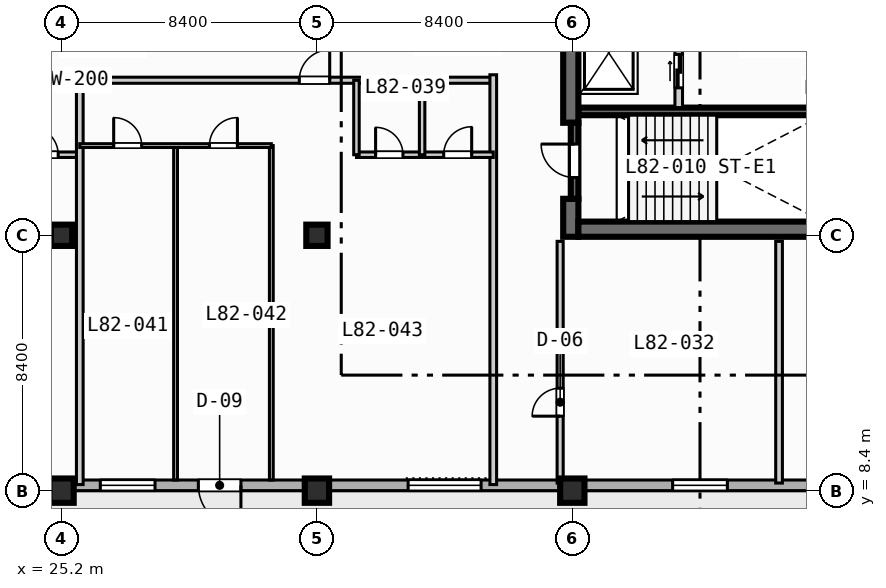
"""IFC4 building model, lengths in metres.
Left out: names, types, materials, properties, quantities, classifications, styles, units other than length and angle.
Written with IfcOpenShell. Run it as: python <this file> out.ifc"""

import sys

from ifc_helpers import new_model, si_unit, direction, frame, frame_2d, origin, origin_2d, place, context, subcontext, project, spatial, rectangle, extrude, element, fill, save


model = new_model("IFC4")
c1 = context("Model", 3, precision=1e-05, world=origin(), true_north=direction((0.0, 1.0)))
c2 = subcontext(c1, "Body", "Model", "MODEL_VIEW")
j1 = project(units=[si_unit("LENGTHUNIT", "METRE"), si_unit("PLANEANGLEUNIT", "RADIAN")], contexts=[c1])
p1 = place(None, origin())
s1 = spatial("IfcSite", under=j1, at=p1, CompositionType="ELEMENT")
p2 = place(p1, origin())
s2 = spatial("IfcBuilding", under=s1, at=p2, CompositionType="ELEMENT")
p3 = place(p2, frame((0.0, 0.0, 332.0)))
s3 = spatial("IfcBuildingStorey", under=s2, at=p3, CompositionType="ELEMENT", Elevation=332.0)
p4 = place(p3, frame((42.2, 20.875, 0.0), z_axis=(0.0, 0.0, 1.0), x_axis=(1.0, 0.0, 0.0)))
e1 = element("IfcWall", 1, at=p4, inside=s3, PredefinedType="SOLIDWALL", context=c2, shape_type="SweptSolid", body=[
    extrude(rectangle(XDim=8.05, YDim=0.25, at=frame_2d((4.025, 0.0))), origin(), (0.0, 0.0, 1.0), 3.67),
])
p5 = place(p3, frame((41.95, 16.75, 0.0), z_axis=(0.0, 0.0, 1.0), x_axis=(0.0, 1.0, 0.0)))
e2 = element("IfcWall", 2, at=p5, inside=s3, PredefinedType="SHEAR", context=c2, shape_type="SweptSolid", body=[
    extrude(rectangle(XDim=1.25, YDim=0.5, at=frame_2d((0.625, 0.0))), origin(), (0.0, 0.0, 1.0), 3.67),
])
p6 = place(p3, frame((41.95, 20.5, 0.0), z_axis=(0.0, 0.0, 1.0), x_axis=(0.0, 1.0, 0.0)))
e3 = element("IfcWall", 3, at=p6, inside=s3, PredefinedType="SHEAR", context=c2, shape_type="SweptSolid", body=[
    extrude(rectangle(XDim=4.95, YDim=0.5, at=frame_2d((2.475, 0.0))), origin(), (0.0, 0.0, 1.0), 3.67),
])
p7 = place(p3, frame((42.2, 17.0, 0.0), z_axis=(0.0, 0.0, 1.0), x_axis=(1.0, 0.0, 0.0)))
e4 = element("IfcWall", 4, at=p7, inside=s3, PredefinedType="SHEAR", context=c2, shape_type="SweptSolid", body=[
    extrude(rectangle(XDim=16.35, YDim=0.5, at=frame_2d((8.175, 0.0))), origin(), (0.0, 0.0, 1.0), 3.67),
])
p8 = place(p3, frame((25.2, 8.4, 0.0), z_axis=(0.0, 0.0, 1.0), x_axis=(1.0, 0.0, 0.0)))
e5 = element("IfcColumn", 5, at=p8, inside=s3, PredefinedType="COLUMN", context=c2, shape_type="SweptSolid", body=[
    extrude(rectangle(XDim=0.8, YDim=0.8, at=origin_2d()), origin(), (0.0, 0.0, 1.0), 3.9),
])
p9 = place(p3, frame((25.2, 16.8, 0.0), z_axis=(0.0, 0.0, 1.0), x_axis=(1.0, 0.0, 0.0)))
e6 = element("IfcColumn", 6, at=p9, inside=s3, PredefinedType="COLUMN", context=c2, shape_type="SweptSolid", body=[
    extrude(rectangle(XDim=0.7, YDim=0.7, at=origin_2d()), origin(), (0.0, 0.0, 1.0), 3.9),
])
p10 = place(p3, frame((33.6, 8.4, 0.0), z_axis=(0.0, 0.0, 1.0), x_axis=(1.0, 0.0, 0.0)))
e7 = element("IfcColumn", 7, at=p10, inside=s3, PredefinedType="COLUMN", context=c2, shape_type="SweptSolid", body=[
    extrude(rectangle(XDim=0.8, YDim=0.8, at=origin_2d()), origin(), (0.0, 0.0, 1.0), 3.9),
])
p11 = place(p3, frame((33.6, 16.8, 0.0), z_axis=(0.0, 0.0, 1.0), x_axis=(1.0, 0.0, 0.0)))
e8 = element("IfcColumn", 8, at=p11, inside=s3, PredefinedType="COLUMN", context=c2, shape_type="SweptSolid", body=[
    extrude(rectangle(XDim=0.7, YDim=0.7, at=origin_2d()), origin(), (0.0, 0.0, 1.0), 3.9),
])
p12 = place(p3, frame((42.0, 8.4, 0.0), z_axis=(0.0, 0.0, 1.0), x_axis=(1.0, 0.0, 0.0)))
e9 = element("IfcColumn", 9, at=p12, inside=s3, PredefinedType="COLUMN", context=c2, shape_type="SweptSolid", body=[
    extrude(rectangle(XDim=0.8, YDim=0.8, at=origin_2d()), origin(), (0.0, 0.0, 1.0), 3.9),
])
p13 = place(p3, frame((64.025, 8.575, 0.0), z_axis=(0.0, 0.0, 1.0), x_axis=(-1.0, 0.0, 0.0)))
e10 = element("IfcWall", 10, at=p13, inside=s3, PredefinedType="STANDARD", context=c2, shape_type="SweptSolid", body=[
    extrude(rectangle(XDim=52.45, YDim=0.35, at=frame_2d((26.225, 0.0))), origin(), (0.0, 0.0, 1.0), 3.67),
])
p14 = place(p13, frame((32.925, 0.0, 0.0)))
e11 = element("IfcOpeningElement", 11, at=p14, cuts=e10, PredefinedType="OPENING", context=c2, shape_type="SweptSolid", body=[
    extrude(rectangle(XDim=1.4, YDim=2.2, at=frame_2d((0.7, 1.1))), frame((0.0, 0.185, 0.0), z_axis=(0.0, -1.0, 0.0), x_axis=(1.0, 0.0, 0.0)), (0.0, 0.0, 1.0), 0.37),
])
p15 = place(p13, frame((41.825, 0.0, 0.85)))
e12 = element("IfcOpeningElement", 12, at=p15, cuts=e10, PredefinedType="OPENING", context=c2, shape_type="SweptSolid", body=[
    extrude(rectangle(XDim=2.4, YDim=1.95, at=frame_2d((1.2, 0.975))), frame((0.0, 0.185, 0.0), z_axis=(0.0, -1.0, 0.0), x_axis=(1.0, 0.0, 0.0)), (0.0, 0.0, 1.0), 0.37),
])
p16 = place(p13, frame((25.025, 0.0, 0.85)))
e13 = element("IfcOpeningElement", 13, at=p16, cuts=e10, PredefinedType="OPENING", context=c2, shape_type="SweptSolid", body=[
    extrude(rectangle(XDim=2.4, YDim=1.95, at=frame_2d((1.2, 0.975))), frame((0.0, 0.185, 0.0), z_axis=(0.0, -1.0, 0.0), x_axis=(1.0, 0.0, 0.0)), (0.0, 0.0, 1.0), 0.37),
])
p17 = place(p13, frame((16.925, 0.0, 0.85)))
e14 = element("IfcOpeningElement", 14, at=p17, cuts=e10, PredefinedType="OPENING", context=c2, shape_type="SweptSolid", body=[
    extrude(rectangle(XDim=1.8, YDim=1.8, at=frame_2d((0.9, 0.9))), frame((0.0, 0.185, 0.0), z_axis=(0.0, -1.0, 0.0), x_axis=(1.0, 0.0, 0.0)), (0.0, 0.0, 1.0), 0.37),
])
p18 = place(p13, frame((49.75, 0.0, 0.85)))
e15 = element("IfcOpeningElement", 15, at=p18, cuts=e10, PredefinedType="OPENING", context=c2, shape_type="SweptSolid", body=[
    extrude(rectangle(XDim=1.8, YDim=1.8, at=frame_2d((0.9, 0.9))), frame((0.0, 0.185, 0.0), z_axis=(0.0, -1.0, 0.0), x_axis=(1.0, 0.0, 0.0)), (0.0, 0.0, 1.0), 0.37),
])
p19 = place(p13, frame((47.89, 0.0, 0.85)))
e16 = element("IfcOpeningElement", 16, at=p19, cuts=e10, PredefinedType="OPENING", context=c2, shape_type="SweptSolid", body=[
    extrude(rectangle(XDim=0.72, YDim=1.8, at=frame_2d((0.36, 0.9))), frame((0.0, 0.185, 0.0), z_axis=(0.0, -1.0, 0.0), x_axis=(1.0, 0.0, 0.0)), (0.0, 0.0, 1.0), 0.37),
])
p20 = place(p13, frame((35.75, 0.0, 0.85)))
e17 = element("IfcOpeningElement", 17, at=p20, cuts=e10, PredefinedType="OPENING", context=c2, shape_type="SweptSolid", body=[
    extrude(rectangle(XDim=1.8, YDim=1.8, at=frame_2d((0.9, 0.9))), frame((0.0, 0.185, 0.0), z_axis=(0.0, -1.0, 0.0), x_axis=(1.0, 0.0, 0.0)), (0.0, 0.0, 1.0), 0.37),
])
p21 = place(p3, frame((42.075, 18.0, 0.0), z_axis=(0.0, 0.0, 1.0), x_axis=(0.0, 1.0, 0.0)))
e18 = element("IfcWall", 18, at=p21, inside=s3, PredefinedType="SOLIDWALL", context=c2, shape_type="SweptSolid", body=[
    extrude(rectangle(XDim=2.5, YDim=0.25, at=frame_2d((1.25, 0.0))), origin(), (0.0, 0.0, 1.0), 3.67),
])
p22 = place(p21, frame((0.7, 0.0, 0.0)))
e19 = element("IfcOpeningElement", 19, at=p22, cuts=e18, PredefinedType="OPENING", context=c2, shape_type="SweptSolid", body=[
    extrude(rectangle(XDim=1.1, YDim=2.15, at=frame_2d((0.55, 1.075))), frame((0.0, 0.135, 0.0), z_axis=(0.0, -1.0, 0.0), x_axis=(1.0, 0.0, 0.0)), (0.0, 0.0, 1.0), 0.27),
])
p23 = place(p3, frame((45.5, 21.0, 0.0), z_axis=(0.0, 0.0, 1.0), x_axis=(0.0, 1.0, 0.0)))
e20 = element("IfcWall", 20, at=p23, inside=s3, PredefinedType="SOLIDWALL", context=c2, shape_type="SweptSolid", body=[
    extrude(rectangle(XDim=4.15, YDim=0.25, at=frame_2d((2.075, 0.0))), origin(), (0.0, 0.0, 1.0), 3.67),
])
p24 = place(p23, frame((0.65, 0.0, 0.0)))
e21 = element("IfcOpeningElement", 21, at=p24, cuts=e20, PredefinedType="OPENING", context=c2, shape_type="SweptSolid", body=[
    extrude(rectangle(XDim=1.1, YDim=2.15, at=frame_2d((0.55, 1.075))), frame((0.0, 0.135, 0.0), z_axis=(0.0, -1.0, 0.0), x_axis=(1.0, 0.0, 0.0)), (0.0, 0.0, 1.0), 0.27),
])
p25 = place(p3, frame((41.6, 8.65, 0.0), z_axis=(0.0, 0.0, 1.0), x_axis=(0.0, 1.0, 0.0)))
e22 = element("IfcWall", 22, at=p25, inside=s3, PredefinedType="PARTITIONING", context=c2, shape_type="SweptSolid", body=[
    extrude(rectangle(XDim=7.95, YDim=0.2, at=frame_2d((3.975, 0.0))), origin(), (0.0, 0.0, 1.0), 3.67),
])
p26 = place(p25, frame((2.2, 0.0, 0.0)))
e23 = element("IfcOpeningElement", 23, at=p26, cuts=e22, PredefinedType="OPENING", context=c2, shape_type="SweptSolid", body=[
    extrude(rectangle(XDim=0.92, YDim=2.1, at=frame_2d((0.46, 1.05))), frame((0.0, 0.11, 0.0), z_axis=(0.0, -1.0, 0.0), x_axis=(1.0, 0.0, 0.0)), (0.0, 0.0, 1.0), 0.22),
])
p27 = place(p3, frame((48.8, 8.65, 0.0), z_axis=(0.0, 0.0, 1.0), x_axis=(0.0, 1.0, 0.0)))
e24 = element("IfcWall", 24, at=p27, inside=s3, PredefinedType="PARTITIONING", context=c2, shape_type="SweptSolid", body=[
    extrude(rectangle(XDim=7.95, YDim=0.22, at=frame_2d((3.975, 0.0))), origin(), (0.0, 0.0, 1.0), 3.67),
])
p28 = place(p3, frame((11.8, 21.9, 0.0), z_axis=(0.0, 0.0, 1.0), x_axis=(1.0, 0.0, 0.0)))
e25 = element("IfcWall", 25, at=p28, inside=s3, PredefinedType="PARTITIONING", context=c2, shape_type="SweptSolid", body=[
    extrude(rectangle(XDim=27.6, YDim=0.2, at=frame_2d((13.8, 0.0))), origin(), (0.0, 0.0, 1.0), 3.67),
])
p29 = place(p28, frame((7.42, 0.0, 0.0)))
e26 = element("IfcOpeningElement", 26, at=p29, cuts=e25, PredefinedType="OPENING", context=c2, shape_type="SweptSolid", body=[
    extrude(rectangle(XDim=1.0, YDim=2.15, at=frame_2d((0.5, 1.075))), frame((0.0, 0.11, 0.0), z_axis=(0.0, -1.0, 0.0), x_axis=(1.0, 0.0, 0.0)), (0.0, 0.0, 1.0), 0.22),
])
p30 = place(p28, frame((21.22, 0.0, 0.0)))
e27 = element("IfcOpeningElement", 27, at=p30, cuts=e25, PredefinedType="OPENING", context=c2, shape_type="SweptSolid", body=[
    extrude(rectangle(XDim=1.0, YDim=2.15, at=frame_2d((0.5, 1.075))), frame((0.0, 0.11, 0.0), z_axis=(0.0, -1.0, 0.0), x_axis=(1.0, 0.0, 0.0)), (0.0, 0.0, 1.0), 0.22),
])
p31 = place(p3, frame((21.3, 19.45, 0.0), z_axis=(0.0, 0.0, 1.0), x_axis=(1.0, 0.0, 0.0)))
e28 = element("IfcWall", 28, at=p31, inside=s3, PredefinedType="PLUMBINGWALL", context=c2, shape_type="SweptSolid", body=[
    extrude(rectangle(XDim=4.5, YDim=0.18, at=frame_2d((2.25, 0.0))), origin(), (0.0, 0.0, 1.0), 3.67),
])
p32 = place(p31, frame((0.63, 0.0, 0.0)))
e29 = element("IfcOpeningElement", 29, at=p32, cuts=e28, PredefinedType="OPENING", context=c2, shape_type="SweptSolid", body=[
    extrude(rectangle(XDim=0.9, YDim=2.1, at=frame_2d((0.45, 1.05))), frame((0.0, 0.1, 0.0), z_axis=(0.0, -1.0, 0.0), x_axis=(1.0, 0.0, 0.0)), (0.0, 0.0, 1.0), 0.2),
])
p33 = place(p31, frame((2.87, 0.0, 0.0)))
e30 = element("IfcOpeningElement", 30, at=p33, cuts=e28, PredefinedType="OPENING", context=c2, shape_type="SweptSolid", body=[
    extrude(rectangle(XDim=0.92, YDim=2.1, at=frame_2d((0.46, 1.05))), frame((0.0, 0.1, 0.0), z_axis=(0.0, -1.0, 0.0), x_axis=(1.0, 0.0, 0.0)), (0.0, 0.0, 1.0), 0.2),
])
for number, where, z_axis, x_axis in (
    (31, (25.8, 8.6, 0.0), (0.0, 0.0, 1.0), (0.0, 1.0, 0.0)),
    (32, (39.4, 8.6, 0.0), (0.0, 0.0, 1.0), (0.0, 1.0, 0.0)),
):
    element("IfcWall", number, at=place(p3, frame(where, z_axis=z_axis, x_axis=x_axis)), inside=s3, PredefinedType="PARTITIONING", context=c2, shape_type="SweptSolid", body=[
        extrude(rectangle(XDim=13.48, YDim=0.22, at=frame_2d((6.74, 0.0))), origin(), (0.0, 0.0, 1.0), 3.67),
    ])
p34 = place(p3, frame((34.9, 19.45, 0.0), z_axis=(0.0, 0.0, 1.0), x_axis=(1.0, 0.0, 0.0)))
e33 = element("IfcWall", 33, at=p34, inside=s3, PredefinedType="PLUMBINGWALL", context=c2, shape_type="SweptSolid", body=[
    extrude(rectangle(XDim=4.5, YDim=0.18, at=frame_2d((2.25, 0.0))), origin(), (0.0, 0.0, 1.0), 3.67),
])
p35 = place(p34, frame((0.63, 0.0, 0.0)))
e34 = element("IfcOpeningElement", 34, at=p35, cuts=e33, PredefinedType="OPENING", context=c2, shape_type="SweptSolid", body=[
    extrude(rectangle(XDim=0.9, YDim=2.1, at=frame_2d((0.45, 1.05))), frame((0.0, 0.1, 0.0), z_axis=(0.0, -1.0, 0.0), x_axis=(1.0, 0.0, 0.0)), (0.0, 0.0, 1.0), 0.2),
])
p36 = place(p34, frame((2.87, 0.0, 0.0)))
e35 = element("IfcOpeningElement", 35, at=p36, cuts=e33, PredefinedType="OPENING", context=c2, shape_type="SweptSolid", body=[
    extrude(rectangle(XDim=0.92, YDim=2.1, at=frame_2d((0.46, 1.05))), frame((0.0, 0.1, 0.0), z_axis=(0.0, -1.0, 0.0), x_axis=(1.0, 0.0, 0.0)), (0.0, 0.0, 1.0), 0.2),
])
for number, where, z_axis, x_axis in (
    (36, (34.9, 19.45, 0.0), (0.0, 0.0, 1.0), (0.0, 1.0, 0.0)),
    (37, (37.06, 19.45, 0.0), (0.0, 0.0, 1.0), (0.0, 1.0, 0.0)),
):
    element("IfcWall", number, at=place(p3, frame(where, z_axis=z_axis, x_axis=x_axis)), inside=s3, PredefinedType="PLUMBINGWALL", context=c2, shape_type="SweptSolid", body=[
        extrude(rectangle(XDim=2.45, YDim=0.18, at=frame_2d((1.225, 0.0))), origin(), (0.0, 0.0, 1.0), 3.67),
    ])
for number, where, z_axis, x_axis in (
    (38, (28.95, 8.75, 0.0), (0.0, 0.0, 1.0), (0.0, 1.0, 0.0)),
    (39, (32.1, 8.75, 0.0), (0.0, 0.0, 1.0), (0.0, 1.0, 0.0)),
):
    element("IfcWall", number, at=place(p3, frame(where, z_axis=z_axis, x_axis=x_axis)), inside=s3, PredefinedType="PARTITIONING", context=c2, shape_type="SweptSolid", body=[
        extrude(rectangle(XDim=11.0, YDim=0.125, at=frame_2d((5.5, 0.0))), origin(), (0.0, 0.0, 1.0), 3.67),
    ])
p37 = place(p3, frame((25.8, 19.75, 0.0), z_axis=(0.0, 0.0, 1.0), x_axis=(1.0, 0.0, 0.0)))
e40 = element("IfcWall", 40, at=p37, inside=s3, PredefinedType="PARTITIONING", context=c2, shape_type="SweptSolid", body=[
    extrude(rectangle(XDim=6.3, YDim=0.125, at=frame_2d((3.15, 0.0))), origin(), (0.0, 0.0, 1.0), 3.67),
])
p38 = place(p37, frame((1.115, 0.0, 0.0)))
e41 = element("IfcOpeningElement", 41, at=p38, cuts=e40, PredefinedType="OPENING", context=c2, shape_type="SweptSolid", body=[
    extrude(rectangle(XDim=0.92, YDim=2.1, at=frame_2d((0.46, 1.05))), frame((0.0, 0.073, 0.0), z_axis=(0.0, -1.0, 0.0), x_axis=(1.0, 0.0, 0.0)), (0.0, 0.0, 1.0), 0.145),
])
p39 = place(p37, frame((4.265, 0.0, 0.0)))
e42 = element("IfcOpeningElement", 42, at=p39, cuts=e40, PredefinedType="OPENING", context=c2, shape_type="SweptSolid", body=[
    extrude(rectangle(XDim=0.92, YDim=2.1, at=frame_2d((0.46, 1.05))), frame((0.0, 0.073, 0.0), z_axis=(0.0, -1.0, 0.0), x_axis=(1.0, 0.0, 0.0)), (0.0, 0.0, 1.0), 0.145),
])
p40 = place(p14, origin())
e43 = element("IfcDoor", 43, at=p40, inside=s3, OperationType="SINGLE_SWING_LEFT", PredefinedType="DOOR", context=c2, shape_type="SweptSolid", body=[
    extrude(rectangle(XDim=1.4, YDim=2.2, at=frame_2d((0.7, 1.1))), frame((0.0, 0.025, 0.0), z_axis=(0.0, -1.0, 0.0), x_axis=(1.0, 0.0, 0.0)), (0.0, 0.0, 1.0), 0.05),
])
fill(e11, e43)
p41 = place(p16, origin())
e44 = element("IfcWindow", 44, at=p41, inside=s3, PartitioningType="SINGLE_PANEL", PredefinedType="WINDOW", context=c2, shape_type="SweptSolid", body=[
    extrude(rectangle(XDim=2.4, YDim=1.95, at=frame_2d((1.2, 0.975))), frame((0.0, 0.03, 0.0), z_axis=(0.0, -1.0, 0.0), x_axis=(1.0, 0.0, 0.0)), (0.0, 0.0, 1.0), 0.06),
])
fill(e13, e44)
p42 = place(p17, origin())
e45 = element("IfcWindow", 45, at=p42, inside=s3, PartitioningType="SINGLE_PANEL", PredefinedType="WINDOW", context=c2, shape_type="SweptSolid", body=[
    extrude(rectangle(XDim=1.8, YDim=1.8, at=frame_2d((0.9, 0.9))), frame((0.0, 0.03, 0.0), z_axis=(0.0, -1.0, 0.0), x_axis=(1.0, 0.0, 0.0)), (0.0, 0.0, 1.0), 0.06),
])
fill(e14, e45)
p43 = place(p20, origin())
e46 = element("IfcWindow", 46, at=p43, inside=s3, PartitioningType="SINGLE_PANEL", PredefinedType="WINDOW", context=c2, shape_type="SweptSolid", body=[
    extrude(rectangle(XDim=1.8, YDim=1.8, at=frame_2d((0.9, 0.9))), frame((0.0, 0.03, 0.0), z_axis=(0.0, -1.0, 0.0), x_axis=(1.0, 0.0, 0.0)), (0.0, 0.0, 1.0), 0.06),
])
fill(e17, e46)
p44 = place(p22, origin())
e47 = element("IfcDoor", 47, at=p44, inside=s3, OperationType="SINGLE_SWING_RIGHT", PredefinedType="DOOR", context=c2, shape_type="SweptSolid", body=[
    extrude(rectangle(XDim=1.1, YDim=2.15, at=frame_2d((0.55, 1.075))), frame((0.0, 0.025, 0.0), z_axis=(0.0, -1.0, 0.0), x_axis=(1.0, 0.0, 0.0)), (0.0, 0.0, 1.0), 0.05),
])
fill(e19, e47)
p45 = place(p24, origin())
e48 = element("IfcDoor", 48, at=p45, inside=s3, OperationType="SLIDING_TO_LEFT", PredefinedType="DOOR", context=c2, shape_type="SweptSolid", body=[
    extrude(rectangle(XDim=1.1, YDim=2.15, at=frame_2d((0.55, 1.075))), frame((0.0, 0.025, 0.0), z_axis=(0.0, -1.0, 0.0), x_axis=(1.0, 0.0, 0.0)), (0.0, 0.0, 1.0), 0.05),
])
fill(e21, e48)
p46 = place(p26, origin())
e49 = element("IfcDoor", 49, at=p46, inside=s3, OperationType="SINGLE_SWING_LEFT", PredefinedType="DOOR", context=c2, shape_type="SweptSolid", body=[
    extrude(rectangle(XDim=0.92, YDim=2.1, at=frame_2d((0.46, 1.05))), frame((0.0, 0.025, 0.0), z_axis=(0.0, -1.0, 0.0), x_axis=(1.0, 0.0, 0.0)), (0.0, 0.0, 1.0), 0.05),
])
fill(e23, e49)
p47 = place(p30, origin())
e50 = element("IfcDoor", 50, at=p47, inside=s3, OperationType="SINGLE_SWING_RIGHT", PredefinedType="DOOR", context=c2, shape_type="SweptSolid", body=[
    extrude(rectangle(XDim=1.0, YDim=2.15, at=frame_2d((0.5, 1.075))), frame((0.0, 0.025, 0.0), z_axis=(0.0, -1.0, 0.0), x_axis=(1.0, 0.0, 0.0)), (0.0, 0.0, 1.0), 0.05),
])
fill(e27, e50)
p48 = place(p33, origin())
e51 = element("IfcDoor", 51, at=p48, inside=s3, OperationType="SINGLE_SWING_LEFT", PredefinedType="DOOR", context=c2, shape_type="SweptSolid", body=[
    extrude(rectangle(XDim=0.92, YDim=2.1, at=frame_2d((0.46, 1.05))), frame((0.0, 0.025, 0.0), z_axis=(0.0, -1.0, 0.0), x_axis=(1.0, 0.0, 0.0)), (0.0, 0.0, 1.0), 0.05),
])
fill(e30, e51)
p49 = place(p35, origin())
e52 = element("IfcDoor", 52, at=p49, inside=s3, OperationType="SINGLE_SWING_LEFT", PredefinedType="DOOR", context=c2, shape_type="SweptSolid", body=[
    extrude(rectangle(XDim=0.9, YDim=2.1, at=frame_2d((0.45, 1.05))), frame((0.0, 0.025, 0.0), z_axis=(0.0, -1.0, 0.0), x_axis=(1.0, 0.0, 0.0)), (0.0, 0.0, 1.0), 0.05),
])
fill(e34, e52)
p50 = place(p36, origin())
e53 = element("IfcDoor", 53, at=p50, inside=s3, OperationType="SINGLE_SWING_RIGHT", PredefinedType="DOOR", context=c2, shape_type="SweptSolid", body=[
    extrude(rectangle(XDim=0.92, YDim=2.1, at=frame_2d((0.46, 1.05))), frame((0.0, 0.025, 0.0), z_axis=(0.0, -1.0, 0.0), x_axis=(1.0, 0.0, 0.0)), (0.0, 0.0, 1.0), 0.05),
])
fill(e35, e53)
p51 = place(p38, origin())
e54 = element("IfcDoor", 54, at=p51, inside=s3, OperationType="SINGLE_SWING_LEFT", PredefinedType="DOOR", context=c2, shape_type="SweptSolid", body=[
    extrude(rectangle(XDim=0.92, YDim=2.1, at=frame_2d((0.46, 1.05))), frame((0.0, 0.025, 0.0), z_axis=(0.0, -1.0, 0.0), x_axis=(1.0, 0.0, 0.0)), (0.0, 0.0, 1.0), 0.05),
])
fill(e41, e54)
p52 = place(p39, origin())
e55 = element("IfcDoor", 55, at=p52, inside=s3, OperationType="SINGLE_SWING_RIGHT", PredefinedType="DOOR", context=c2, shape_type="SweptSolid", body=[
    extrude(rectangle(XDim=0.92, YDim=2.1, at=frame_2d((0.46, 1.05))), frame((0.0, 0.025, 0.0), z_axis=(0.0, -1.0, 0.0), x_axis=(1.0, 0.0, 0.0)), (0.0, 0.0, 1.0), 0.05),
])
fill(e42, e55)
save(model, sys.argv[1])
